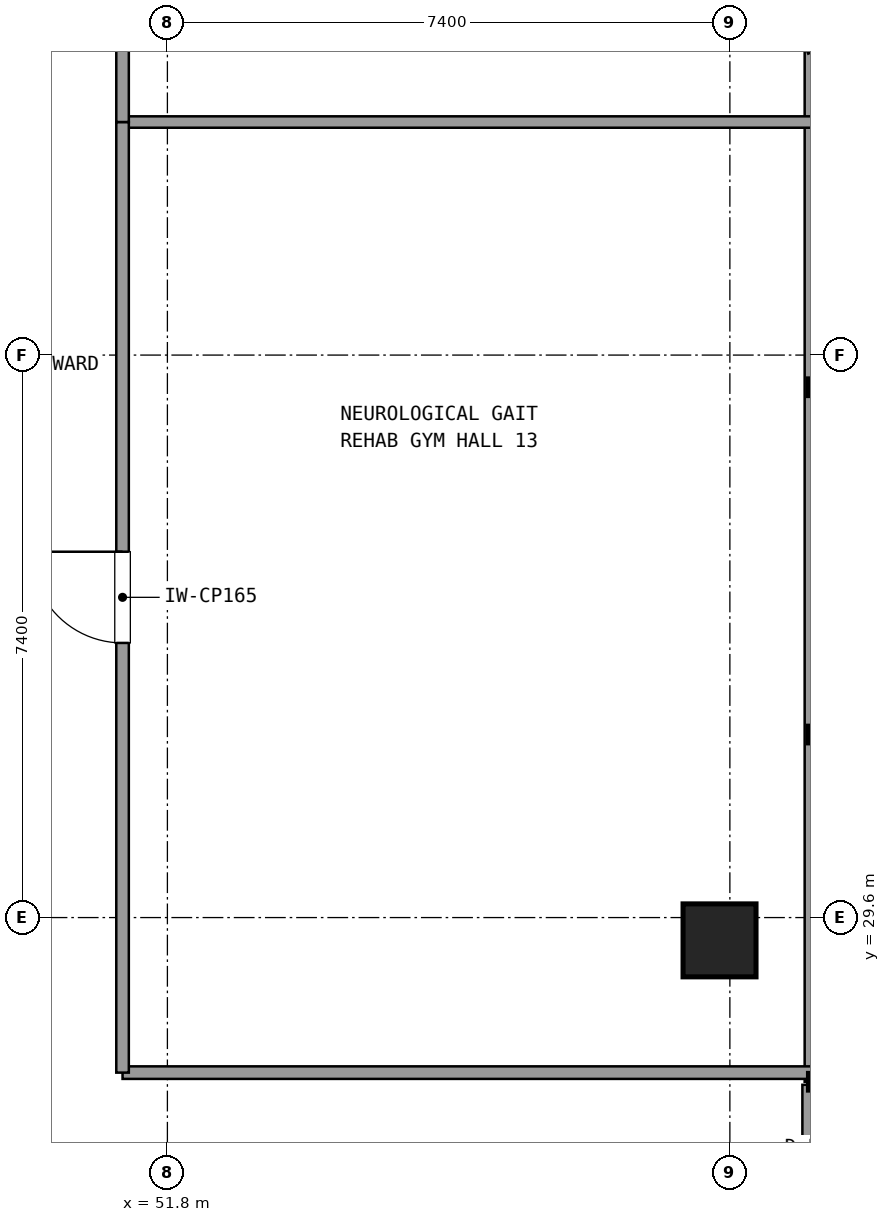
"""IFC4 building model, lengths in metres.
Left out: names, types, materials, properties, quantities, classifications, styles, units other than length and angle.
Written with IfcOpenShell. Run it as: python <this file> out.ifc"""

import sys

from ifc_helpers import new_model, si_unit, direction, frame, frame_2d, origin, origin_2d, place, context, subcontext, project, spatial, rectangle, extrude, element, fill, save


model = new_model("IFC4")
c1 = context("Model", 3, precision=1e-05, world=origin(), true_north=direction((0.0, 1.0)))
c2 = subcontext(c1, "Body", "Model", "MODEL_VIEW")
j1 = project(units=[si_unit("LENGTHUNIT", "METRE"), si_unit("PLANEANGLEUNIT", "RADIAN")], contexts=[c1])
p1 = place(None, origin())
s1 = spatial("IfcSite", under=j1, at=p1, CompositionType="ELEMENT")
p2 = place(p1, origin())
s2 = spatial("IfcBuilding", under=s1, at=p2, CompositionType="ELEMENT")
p3 = place(p2, frame((0.0, 0.0, 170.82)))
s3 = spatial("IfcBuildingStorey", under=s2, at=p3, CompositionType="ELEMENT", Elevation=170.82)
p4 = place(p3, frame((59.064, 29.3, 0.0), z_axis=(0.0, 0.0, 1.0), x_axis=(1.0, 0.0, 0.0)))
e1 = element("IfcColumn", 1, at=p4, inside=s3, PredefinedType="COLUMN", context=c2, shape_type="SweptSolid", body=[
    extrude(rectangle(XDim=0.96, YDim=0.96, at=origin_2d()), origin(), (0.0, 0.0, 1.0), 3.6),
])
p5 = place(p3, frame((60.304, 24.4, 0.0), z_axis=(0.0, 0.0, 1.0), x_axis=(0.0, 1.0, 0.0)))
e2 = element("IfcWall", 2, at=p5, inside=s3, PredefinedType="SOLIDWALL", context=c2, shape_type="SweptSolid", body=[
    extrude(rectangle(XDim=3.0, YDim=0.3, at=frame_2d((1.5, 0.0))), origin(), (0.0, 0.0, 1.0), 2.67),
])
p6 = place(p5, frame((0.9, 0.0, 0.0)))
e3 = element("IfcOpeningElement", 3, at=p6, cuts=e2, PredefinedType="OPENING", context=c2, shape_type="SweptSolid", body=[
    extrude(rectangle(XDim=1.2, YDim=2.2, at=frame_2d((0.6, 1.1))), frame((0.0, 0.16, 0.0), z_axis=(0.0, -1.0, 0.0), x_axis=(1.0, 0.0, 0.0)), (0.0, 0.0, 1.0), 0.32),
])
p7 = place(p3, frame((60.304, 27.44, 0.0), z_axis=(0.0, 0.0, 1.0), x_axis=(0.0, 1.0, 0.0)))
e4 = element("IfcWall", 4, at=p7, inside=s3, PredefinedType="SOLIDWALL", context=c2, shape_type="SweptSolid", body=[
    extrude(rectangle(XDim=13.705, YDim=0.24, at=frame_2d((6.853, 0.0))), origin(), (0.0, 0.0, 1.0), 0.85),
])
p8 = place(p3, frame((51.21, 27.56, 0.0), z_axis=(0.0, 0.0, 1.0), x_axis=(1.0, 0.0, 0.0)))
e5 = element("IfcWall", 5, at=p8, inside=s3, PredefinedType="PARTITIONING", context=c2, shape_type="SweptSolid", body=[
    extrude(rectangle(XDim=9.074, YDim=0.165, at=frame_2d((4.537, 0.0))), origin(), (0.0, 0.0, 1.0), 2.61),
])
p9 = place(p3, frame((51.21, 40.066, 0.0), z_axis=(0.0, 0.0, 1.0), x_axis=(1.0, 0.0, 0.0)))
e6 = element("IfcWall", 6, at=p9, inside=s3, PredefinedType="PARTITIONING", context=c2, shape_type="SweptSolid", body=[
    extrude(rectangle(XDim=9.074, YDim=0.15, at=frame_2d((4.537, 0.0))), origin(), (0.0, 0.0, 1.0), 2.61),
])
p10 = place(p3, frame((51.21, 27.56, 0.0), z_axis=(0.0, 0.0, 1.0), x_axis=(0.0, 1.0, 0.0)))
e7 = element("IfcWall", 7, at=p10, inside=s3, PredefinedType="PARTITIONING", context=c2, shape_type="SweptSolid", body=[
    extrude(rectangle(XDim=12.506, YDim=0.165, at=frame_2d((6.253, 0.0))), origin(), (0.0, 0.0, 1.0), 2.61),
])
p11 = place(p10, frame((5.653, 0.0, 0.0)))
e8 = element("IfcOpeningElement", 8, at=p11, cuts=e7, PredefinedType="OPENING", context=c2, shape_type="SweptSolid", body=[
    extrude(rectangle(XDim=1.2, YDim=2.15, at=frame_2d((0.6, 1.075))), frame((0.0, 0.093, 0.0), z_axis=(0.0, -1.0, 0.0), x_axis=(1.0, 0.0, 0.0)), (0.0, 0.0, 1.0), 0.185),
])
p12 = place(p3, frame((51.21, 40.066, 0.0), z_axis=(0.0, 0.0, 1.0), x_axis=(0.0, 1.0, 0.0)))
e9 = element("IfcWall", 9, at=p12, inside=s3, PredefinedType="PARTITIONING", context=c2, shape_type="SweptSolid", body=[
    extrude(rectangle(XDim=7.034, YDim=0.165, at=frame_2d((3.517, 0.0))), origin(), (0.0, 0.0, 1.0), 2.61),
])
p13 = place(p12, frame((2.917, 0.0, 0.0)))
e10 = element("IfcOpeningElement", 10, at=p13, cuts=e9, PredefinedType="OPENING", context=c2, shape_type="SweptSolid", body=[
    extrude(rectangle(XDim=1.2, YDim=2.15, at=frame_2d((0.6, 1.075))), frame((0.0, 0.093, 0.0), z_axis=(0.0, -1.0, 0.0), x_axis=(1.0, 0.0, 0.0)), (0.0, 0.0, 1.0), 0.185),
])
p14 = place(p11, origin())
e11 = element("IfcDoor", 11, at=p14, inside=s3, OperationType="SINGLE_SWING_RIGHT", PredefinedType="DOOR", context=c2, shape_type="SweptSolid", body=[
    extrude(rectangle(XDim=1.2, YDim=2.15, at=frame_2d((0.6, 1.075))), frame((0.0, 0.025, 0.0), z_axis=(0.0, -1.0, 0.0), x_axis=(1.0, 0.0, 0.0)), (0.0, 0.0, 1.0), 0.05),
])
fill(e8, e11)
save(model, sys.argv[1])
